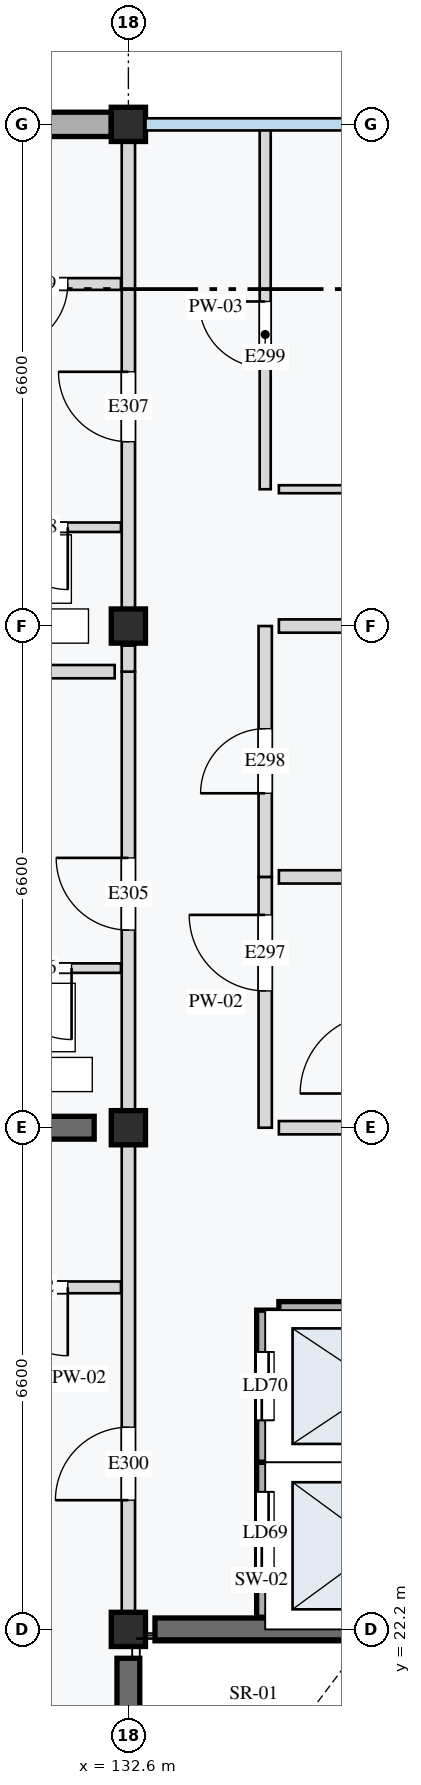
"""IFC4 building model, lengths in metres.
Left out: names, types, materials, properties, quantities, classifications, styles, units other than length and angle.
Written with IfcOpenShell. Run it as: python <this file> out.ifc"""

import sys

from ifc_helpers import new_model, si_unit, direction, frame, frame_2d, origin, origin_2d, place, context, subcontext, project, spatial, rectangle, extrude, element, fill, save


model = new_model("IFC4")
c1 = context("Model", 3, precision=1e-05, world=origin(), true_north=direction((0.0, 1.0)))
c2 = subcontext(c1, "Body", "Model", "MODEL_VIEW")
j1 = project(units=[si_unit("LENGTHUNIT", "METRE"), si_unit("PLANEANGLEUNIT", "RADIAN")], contexts=[c1])
p1 = place(None, origin())
s1 = spatial("IfcSite", under=j1, at=p1, CompositionType="ELEMENT")
p2 = place(p1, origin())
s2 = spatial("IfcBuilding", under=s1, at=p2, CompositionType="ELEMENT")
p3 = place(p2, frame((0.0, 0.0, 24.4)))
s3 = spatial("IfcBuildingStorey", under=s2, at=p3, CompositionType="ELEMENT", Elevation=24.4)
for number, where, z_axis, x_axis in (
    (1, (132.6, 22.2, 0.0), (0.0, 0.0, 1.0), (1.0, 0.0, 0.0)),
    (2, (132.6, 28.8, 0.0), (0.0, 0.0, 1.0), (1.0, 0.0, 0.0)),
    (3, (132.6, 35.4, 0.0), (0.0, 0.0, 1.0), (1.0, 0.0, 0.0)),
    (4, (132.6, 42.0, 0.0), (0.0, 0.0, 1.0), (1.0, 0.0, 0.0)),
):
    element("IfcColumn", number, at=place(p3, frame(where, z_axis=z_axis, x_axis=x_axis)), inside=s3, PredefinedType="COLUMN", context=c2, shape_type="SweptSolid", body=[
        extrude(rectangle(XDim=0.45, YDim=0.45, at=origin_2d()), origin(), (0.0, 0.0, 1.0), 3.2),
    ])
p4 = place(p3, frame((132.6, 15.98, 0.0), z_axis=(0.0, 0.0, 1.0), x_axis=(0.0, 1.0, 0.0)))
e5 = element("IfcWall", 5, at=p4, inside=s3, PredefinedType="SHEAR", context=c2, shape_type="SweptSolid", body=[
    extrude(rectangle(XDim=5.84, YDim=0.3, at=frame_2d((2.92, 0.0))), origin(), (0.0, 0.0, 1.0), 2.97),
])
p5 = place(p3, frame((132.95, 22.2, 0.0), z_axis=(0.0, 0.0, 1.0), x_axis=(1.0, 0.0, 0.0)))
e6 = element("IfcWall", 6, at=p5, inside=s3, PredefinedType="SHEAR", context=c2, shape_type="SweptSolid", body=[
    extrude(rectangle(XDim=2.8, YDim=0.3, at=frame_2d((1.4, 0.0))), origin(), (0.0, 0.0, 1.0), 2.97),
])
p6 = place(p3, frame((126.45, 28.8, 0.0), z_axis=(0.0, 0.0, 1.0), x_axis=(1.0, 0.0, 0.0)))
e7 = element("IfcWall", 7, at=p6, inside=s3, PredefinedType="SHEAR", context=c2, shape_type="SweptSolid", body=[
    extrude(rectangle(XDim=5.7, YDim=0.3, at=frame_2d((2.85, 0.0))), origin(), (0.0, 0.0, 1.0), 2.97),
])
p7 = place(p3, frame((126.225, 42.0, 0.0), z_axis=(0.0, 0.0, 1.0), x_axis=(1.0, 0.0, 0.0)))
e8 = element("IfcWall", 8, at=p7, inside=s3, PredefinedType="STANDARD", context=c2, shape_type="SweptSolid", body=[
    extrude(rectangle(XDim=6.15, YDim=0.32, at=frame_2d((3.075, 0.0))), origin(), (0.0, 0.0, 1.0), 2.65),
])
p8 = place(p3, frame((134.4, 22.36, 0.0), z_axis=(0.0, 0.0, 1.0), x_axis=(0.0, 1.0, 0.0)))
e9 = element("IfcWall", 9, at=p8, inside=s3, PredefinedType="STANDARD", context=c2, shape_type="SweptSolid", body=[
    extrude(rectangle(XDim=2.04, YDim=0.225, at=frame_2d((1.02, 0.0))), origin(), (0.0, 0.0, 1.0), 2.97),
])
p9 = place(p8, frame((0.55, 0.0, 0.0)))
e10 = element("IfcOpeningElement", 10, at=p9, cuts=e9, PredefinedType="OPENING", context=c2, shape_type="SweptSolid", body=[
    extrude(rectangle(XDim=1.1, YDim=2.1, at=frame_2d((0.55, 1.05))), frame((0.0, 0.123, 0.0), z_axis=(0.0, -1.0, 0.0), x_axis=(1.0, 0.0, 0.0)), (0.0, 0.0, 1.0), 0.245),
])
p10 = place(p3, frame((134.4, 24.4, 0.0), z_axis=(0.0, 0.0, 1.0), x_axis=(0.0, 1.0, 0.0)))
e11 = element("IfcWall", 11, at=p10, inside=s3, PredefinedType="STANDARD", context=c2, shape_type="SweptSolid", body=[
    extrude(rectangle(XDim=2.0, YDim=0.225, at=frame_2d((1.0, 0.0))), origin(), (0.0, 0.0, 1.0), 2.97),
])
p11 = place(p10, frame((0.55, 0.0, 0.0)))
e12 = element("IfcOpeningElement", 12, at=p11, cuts=e11, PredefinedType="OPENING", context=c2, shape_type="SweptSolid", body=[
    extrude(rectangle(XDim=0.9, YDim=2.1, at=frame_2d((0.45, 1.05))), frame((0.0, 0.123, 0.0), z_axis=(0.0, -1.0, 0.0), x_axis=(1.0, 0.0, 0.0)), (0.0, 0.0, 1.0), 0.245),
])
for number, where, z_axis, x_axis in (
    (13, (134.58, 24.4, 0.0), (0.0, 0.0, 1.0), (1.0, 0.0, 0.0)),
    (14, (134.58, 26.4, 0.0), (0.0, 0.0, 1.0), (1.0, 0.0, 0.0)),
):
    element("IfcWall", number, at=place(p3, frame(where, z_axis=z_axis, x_axis=x_axis)), inside=s3, PredefinedType="STANDARD", context=c2, shape_type="SweptSolid", body=[
        extrude(rectangle(XDim=2.64, YDim=0.225, at=frame_2d((1.32, 0.0))), origin(), (0.0, 0.0, 1.0), 2.97),
    ])
p12 = place(p3, frame((134.4, 28.8, 0.0), z_axis=(0.0, 0.0, 1.0), x_axis=(0.0, 1.0, 0.0)))
e15 = element("IfcWall", 15, at=p12, inside=s3, PredefinedType="PARTITIONING", context=c2, shape_type="SweptSolid", body=[
    extrude(rectangle(XDim=3.3, YDim=0.175, at=frame_2d((1.65, 0.0))), origin(), (0.0, 0.0, 1.0), 2.97),
])
p13 = place(p12, frame((1.8, 0.0, 0.0)))
e16 = element("IfcOpeningElement", 16, at=p13, cuts=e15, PredefinedType="OPENING", context=c2, shape_type="SweptSolid", body=[
    extrude(rectangle(XDim=1.0, YDim=2.1, at=frame_2d((0.5, 1.05))), frame((0.0, 0.097, 0.0), z_axis=(0.0, -1.0, 0.0), x_axis=(1.0, 0.0, 0.0)), (0.0, 0.0, 1.0), 0.195),
])
p14 = place(p3, frame((134.4, 32.1, 0.0), z_axis=(0.0, 0.0, 1.0), x_axis=(0.0, 1.0, 0.0)))
e17 = element("IfcWall", 17, at=p14, inside=s3, PredefinedType="PARTITIONING", context=c2, shape_type="SweptSolid", body=[
    extrude(rectangle(XDim=3.3, YDim=0.175, at=frame_2d((1.65, 0.0))), origin(), (0.0, 0.0, 1.0), 2.97),
])
p15 = place(p14, frame((1.1, 0.0, 0.0)))
e18 = element("IfcOpeningElement", 18, at=p15, cuts=e17, PredefinedType="OPENING", context=c2, shape_type="SweptSolid", body=[
    extrude(rectangle(XDim=0.85, YDim=2.0, at=frame_2d((0.425, 1.0))), frame((0.0, 0.097, 0.0), z_axis=(0.0, -1.0, 0.0), x_axis=(1.0, 0.0, 0.0)), (0.0, 0.0, 1.0), 0.195),
])
for number, where, z_axis, x_axis in (
    (19, (134.58, 28.8, 0.0), (0.0, 0.0, 1.0), (1.0, 0.0, 0.0)),
    (20, (134.58, 32.1, 0.0), (0.0, 0.0, 1.0), (1.0, 0.0, 0.0)),
    (21, (134.58, 35.4, 0.0), (0.0, 0.0, 1.0), (1.0, 0.0, 0.0)),
):
    element("IfcWall", number, at=place(p3, frame(where, z_axis=z_axis, x_axis=x_axis)), inside=s3, PredefinedType="PARTITIONING", context=c2, shape_type="SweptSolid", body=[
        extrude(rectangle(XDim=1.14, YDim=0.175, at=frame_2d((0.57, 0.0))), origin(), (0.0, 0.0, 1.0), 2.97),
    ])
p16 = place(p3, frame((134.4, 37.2, 0.0), z_axis=(0.0, 0.0, 1.0), x_axis=(0.0, 1.0, 0.0)))
e22 = element("IfcWall", 22, at=p16, inside=s3, PredefinedType="PARTITIONING", context=c2, shape_type="SweptSolid", body=[
    extrude(rectangle(XDim=4.8, YDim=0.145, at=frame_2d((2.4, 0.0))), origin(), (0.0, 0.0, 1.0), 2.97),
])
p17 = place(p16, frame((1.6, 0.0, 0.0)))
e23 = element("IfcOpeningElement", 23, at=p17, cuts=e22, PredefinedType="OPENING", context=c2, shape_type="SweptSolid", body=[
    extrude(rectangle(XDim=0.87, YDim=2.08, at=frame_2d((0.435, 1.04))), frame((0.0, 0.083, 0.0), z_axis=(0.0, -1.0, 0.0), x_axis=(1.0, 0.0, 0.0)), (0.0, 0.0, 1.0), 0.165),
])
p18 = place(p3, frame((134.58, 37.2, 0.0), z_axis=(0.0, 0.0, 1.0), x_axis=(1.0, 0.0, 0.0)))
e24 = element("IfcWall", 24, at=p18, inside=s3, PredefinedType="PARTITIONING", context=c2, shape_type="SweptSolid", body=[
    extrude(rectangle(XDim=2.64, YDim=0.105, at=frame_2d((1.32, 0.0))), origin(), (0.0, 0.0, 1.0), 2.97),
])
p19 = place(p3, frame((132.6, 22.2, 0.0), z_axis=(0.0, 0.0, 1.0), x_axis=(0.0, 1.0, 0.0)))
e25 = element("IfcWall", 25, at=p19, inside=s3, PredefinedType="PARTITIONING", context=c2, shape_type="SweptSolid", body=[
    extrude(rectangle(XDim=6.6, YDim=0.175, at=frame_2d((3.3, 0.0))), origin(), (0.0, 0.0, 1.0), 2.7),
])
p20 = place(p19, frame((1.7, 0.0, 0.0)))
e26 = element("IfcOpeningElement", 26, at=p20, cuts=e25, PredefinedType="OPENING", context=c2, shape_type="SweptSolid", body=[
    extrude(rectangle(XDim=0.96, YDim=2.18, at=frame_2d((0.48, 1.09))), frame((0.0, 0.097, 0.0), z_axis=(0.0, -1.0, 0.0), x_axis=(1.0, 0.0, 0.0)), (0.0, 0.0, 1.0), 0.195),
])
p21 = place(p3, frame((132.502, 26.7, 0.0), z_axis=(0.0, 0.0, 1.0), x_axis=(-1.0, 0.0, 0.0)))
e27 = element("IfcWall", 27, at=p21, inside=s3, PredefinedType="PARTITIONING", context=c2, shape_type="SweptSolid", body=[
    extrude(rectangle(XDim=2.302, YDim=0.155, at=frame_2d((1.151, 0.0))), origin(), (0.0, 0.0, 1.0), 2.97),
])
p22 = place(p21, frame((0.7, 0.0, 0.0)))
e28 = element("IfcOpeningElement", 28, at=p22, cuts=e27, PredefinedType="OPENING", context=c2, shape_type="SweptSolid", body=[
    extrude(rectangle(XDim=0.9, YDim=2.16, at=frame_2d((0.45, 1.08))), frame((0.0, 0.087, 0.0), z_axis=(0.0, -1.0, 0.0), x_axis=(1.0, 0.0, 0.0)), (0.0, 0.0, 1.0), 0.175),
])
p23 = place(p3, frame((132.6, 28.8, 0.0), z_axis=(0.0, 0.0, 1.0), x_axis=(0.0, 1.0, 0.0)))
e29 = element("IfcWall", 29, at=p23, inside=s3, PredefinedType="PARTITIONING", context=c2, shape_type="SweptSolid", body=[
    extrude(rectangle(XDim=6.0, YDim=0.175, at=frame_2d((3.0, 0.0))), origin(), (0.0, 0.0, 1.0), 2.7),
])
p24 = place(p23, frame((2.6, 0.0, 0.0)))
e30 = element("IfcOpeningElement", 30, at=p24, cuts=e29, PredefinedType="OPENING", context=c2, shape_type="SweptSolid", body=[
    extrude(rectangle(XDim=0.95, YDim=2.1, at=frame_2d((0.475, 1.05))), frame((0.0, 0.097, 0.0), z_axis=(0.0, -1.0, 0.0), x_axis=(1.0, 0.0, 0.0)), (0.0, 0.0, 1.0), 0.195),
])
p25 = place(p3, frame((132.502, 30.9, 0.0), z_axis=(0.0, 0.0, 1.0), x_axis=(-1.0, 0.0, 0.0)))
e31 = element("IfcWall", 31, at=p25, inside=s3, PredefinedType="PARTITIONING", context=c2, shape_type="SweptSolid", body=[
    extrude(rectangle(XDim=2.202, YDim=0.125, at=frame_2d((1.101, 0.0))), origin(), (0.0, 0.0, 1.0), 2.97),
])
p26 = place(p25, frame((0.65, 0.0, 0.0)))
e32 = element("IfcOpeningElement", 32, at=p26, cuts=e31, PredefinedType="OPENING", context=c2, shape_type="SweptSolid", body=[
    extrude(rectangle(XDim=0.94, YDim=2.08, at=frame_2d((0.47, 1.04))), frame((0.0, 0.073, 0.0), z_axis=(0.0, -1.0, 0.0), x_axis=(1.0, 0.0, 0.0)), (0.0, 0.0, 1.0), 0.145),
])
p27 = place(p3, frame((132.42, 34.8, 0.0), z_axis=(0.0, 0.0, 1.0), x_axis=(-1.0, 0.0, 0.0)))
e33 = element("IfcWall", 33, at=p27, inside=s3, PredefinedType="PARTITIONING", context=c2, shape_type="SweptSolid", body=[
    extrude(rectangle(XDim=6.19, YDim=0.175, at=frame_2d((3.095, 0.0))), origin(), (0.0, 0.0, 1.0), 2.97),
])
p28 = place(p3, frame((132.6, 34.8, 0.0), z_axis=(0.0, 0.0, 1.0), x_axis=(0.0, 1.0, 0.0)))
e34 = element("IfcWall", 34, at=p28, inside=s3, PredefinedType="PARTITIONING", context=c2, shape_type="SweptSolid", body=[
    extrude(rectangle(XDim=0.345, YDim=0.175, at=frame_2d((0.172, 0.0))), origin(), (0.0, 0.0, 1.0), 2.97),
])
p29 = place(p3, frame((132.6, 35.145, 0.0), z_axis=(0.0, 0.0, 1.0), x_axis=(0.0, 1.0, 0.0)))
e35 = element("IfcWall", 35, at=p29, inside=s3, PredefinedType="PARTITIONING", context=c2, shape_type="SweptSolid", body=[
    extrude(rectangle(XDim=6.855, YDim=0.175, at=frame_2d((3.427, 0.0))), origin(), (0.0, 0.0, 1.0), 2.7),
])
p30 = place(p29, frame((2.68, 0.0, 0.0)))
e36 = element("IfcOpeningElement", 36, at=p30, cuts=e35, PredefinedType="OPENING", context=c2, shape_type="SweptSolid", body=[
    extrude(rectangle(XDim=0.92, YDim=2.14, at=frame_2d((0.46, 1.07))), frame((0.0, 0.097, 0.0), z_axis=(0.0, -1.0, 0.0), x_axis=(1.0, 0.0, 0.0)), (0.0, 0.0, 1.0), 0.195),
])
p31 = place(p3, frame((132.502, 36.7, 0.0), z_axis=(0.0, 0.0, 1.0), x_axis=(-1.0, 0.0, 0.0)))
e37 = element("IfcWall", 37, at=p31, inside=s3, PredefinedType="PARTITIONING", context=c2, shape_type="SweptSolid", body=[
    extrude(rectangle(XDim=2.302, YDim=0.125, at=frame_2d((1.151, 0.0))), origin(), (0.0, 0.0, 1.0), 2.97),
])
p32 = place(p31, frame((0.7, 0.0, 0.0)))
e38 = element("IfcOpeningElement", 38, at=p32, cuts=e37, PredefinedType="OPENING", context=c2, shape_type="SweptSolid", body=[
    extrude(rectangle(XDim=0.82, YDim=2.05, at=frame_2d((0.41, 1.025))), frame((0.0, 0.073, 0.0), z_axis=(0.0, -1.0, 0.0), x_axis=(1.0, 0.0, 0.0)), (0.0, 0.0, 1.0), 0.145),
])
p33 = place(p3, frame((132.502, 39.9, 0.0), z_axis=(0.0, 0.0, 1.0), x_axis=(-1.0, 0.0, 0.0)))
e39 = element("IfcWall", 39, at=p33, inside=s3, PredefinedType="PARTITIONING", context=c2, shape_type="SweptSolid", body=[
    extrude(rectangle(XDim=2.302, YDim=0.155, at=frame_2d((1.151, 0.0))), origin(), (0.0, 0.0, 1.0), 2.97),
])
p34 = place(p33, frame((0.7, 0.0, 0.0)))
e40 = element("IfcOpeningElement", 40, at=p34, cuts=e39, PredefinedType="OPENING", context=c2, shape_type="SweptSolid", body=[
    extrude(rectangle(XDim=0.85, YDim=2.1, at=frame_2d((0.425, 1.05))), frame((0.0, 0.087, 0.0), z_axis=(0.0, -1.0, 0.0), x_axis=(1.0, 0.0, 0.0)), (0.0, 0.0, 1.0), 0.175),
])
p35 = place(p9, origin())
e41 = element("IfcDoor", 41, at=p35, inside=s3, OperationType="DOUBLE_DOOR_SLIDING", PredefinedType="DOOR", context=c2, shape_type="SweptSolid", body=[
    extrude(rectangle(XDim=1.1, YDim=2.1, at=frame_2d((0.55, 1.05))), frame((0.0, 0.025, 0.0), z_axis=(0.0, -1.0, 0.0), x_axis=(1.0, 0.0, 0.0)), (0.0, 0.0, 1.0), 0.05),
])
fill(e10, e41)
p36 = place(p11, origin())
e42 = element("IfcDoor", 42, at=p36, inside=s3, OperationType="DOUBLE_DOOR_SLIDING", PredefinedType="DOOR", context=c2, shape_type="SweptSolid", body=[
    extrude(rectangle(XDim=0.9, YDim=2.1, at=frame_2d((0.45, 1.05))), frame((0.0, 0.025, 0.0), z_axis=(0.0, -1.0, 0.0), x_axis=(1.0, 0.0, 0.0)), (0.0, 0.0, 1.0), 0.05),
])
fill(e12, e42)
p37 = place(p13, origin())
e43 = element("IfcDoor", 43, at=p37, inside=s3, OperationType="SINGLE_SWING_RIGHT", PredefinedType="DOOR", context=c2, shape_type="SweptSolid", body=[
    extrude(rectangle(XDim=1.0, YDim=2.1, at=frame_2d((0.5, 1.05))), frame((0.0, 0.025, 0.0), z_axis=(0.0, -1.0, 0.0), x_axis=(1.0, 0.0, 0.0)), (0.0, 0.0, 1.0), 0.05),
])
fill(e16, e43)
p38 = place(p15, origin())
e44 = element("IfcDoor", 44, at=p38, inside=s3, OperationType="SINGLE_SWING_LEFT", PredefinedType="DOOR", context=c2, shape_type="SweptSolid", body=[
    extrude(rectangle(XDim=0.85, YDim=2.0, at=frame_2d((0.425, 1.0))), frame((0.0, 0.025, 0.0), z_axis=(0.0, -1.0, 0.0), x_axis=(1.0, 0.0, 0.0)), (0.0, 0.0, 1.0), 0.05),
])
fill(e18, e44)
p39 = place(p17, origin())
e45 = element("IfcDoor", 45, at=p39, inside=s3, OperationType="SINGLE_SWING_RIGHT", PredefinedType="DOOR", context=c2, shape_type="SweptSolid", body=[
    extrude(rectangle(XDim=0.87, YDim=2.08, at=frame_2d((0.435, 1.04))), frame((0.0, 0.025, 0.0), z_axis=(0.0, -1.0, 0.0), x_axis=(1.0, 0.0, 0.0)), (0.0, 0.0, 1.0), 0.05),
])
fill(e23, e45)
p40 = place(p20, origin())
e46 = element("IfcDoor", 46, at=p40, inside=s3, OperationType="SINGLE_SWING_LEFT", PredefinedType="DOOR", context=c2, shape_type="SweptSolid", body=[
    extrude(rectangle(XDim=0.96, YDim=2.18, at=frame_2d((0.48, 1.09))), frame((0.0, 0.025, 0.0), z_axis=(0.0, -1.0, 0.0), x_axis=(1.0, 0.0, 0.0)), (0.0, 0.0, 1.0), 0.05),
])
fill(e26, e46)
p41 = place(p22, origin())
e47 = element("IfcDoor", 47, at=p41, inside=s3, OperationType="SINGLE_SWING_LEFT", PredefinedType="DOOR", context=c2, shape_type="SweptSolid", body=[
    extrude(rectangle(XDim=0.9, YDim=2.16, at=frame_2d((0.45, 1.08))), frame((0.0, 0.025, 0.0), z_axis=(0.0, -1.0, 0.0), x_axis=(1.0, 0.0, 0.0)), (0.0, 0.0, 1.0), 0.05),
])
fill(e28, e47)
p42 = place(p24, origin())
e48 = element("IfcDoor", 48, at=p42, inside=s3, OperationType="SINGLE_SWING_RIGHT", PredefinedType="DOOR", context=c2, shape_type="SweptSolid", body=[
    extrude(rectangle(XDim=0.95, YDim=2.1, at=frame_2d((0.475, 1.05))), frame((0.0, 0.025, 0.0), z_axis=(0.0, -1.0, 0.0), x_axis=(1.0, 0.0, 0.0)), (0.0, 0.0, 1.0), 0.05),
])
fill(e30, e48)
p43 = place(p26, origin())
e49 = element("IfcDoor", 49, at=p43, inside=s3, OperationType="SINGLE_SWING_LEFT", PredefinedType="DOOR", context=c2, shape_type="SweptSolid", body=[
    extrude(rectangle(XDim=0.94, YDim=2.08, at=frame_2d((0.47, 1.04))), frame((0.0, 0.025, 0.0), z_axis=(0.0, -1.0, 0.0), x_axis=(1.0, 0.0, 0.0)), (0.0, 0.0, 1.0), 0.05),
])
fill(e32, e49)
p44 = place(p30, origin())
e50 = element("IfcDoor", 50, at=p44, inside=s3, OperationType="SINGLE_SWING_RIGHT", PredefinedType="DOOR", context=c2, shape_type="SweptSolid", body=[
    extrude(rectangle(XDim=0.92, YDim=2.14, at=frame_2d((0.46, 1.07))), frame((0.0, 0.025, 0.0), z_axis=(0.0, -1.0, 0.0), x_axis=(1.0, 0.0, 0.0)), (0.0, 0.0, 1.0), 0.05),
])
fill(e36, e50)
p45 = place(p32, origin())
e51 = element("IfcDoor", 51, at=p45, inside=s3, OperationType="SINGLE_SWING_LEFT", PredefinedType="DOOR", context=c2, shape_type="SweptSolid", body=[
    extrude(rectangle(XDim=0.82, YDim=2.05, at=frame_2d((0.41, 1.025))), frame((0.0, 0.025, 0.0), z_axis=(0.0, -1.0, 0.0), x_axis=(1.0, 0.0, 0.0)), (0.0, 0.0, 1.0), 0.05),
])
fill(e38, e51)
p46 = place(p34, origin())
e52 = element("IfcDoor", 52, at=p46, inside=s3, OperationType="SINGLE_SWING_RIGHT", PredefinedType="DOOR", context=c2, shape_type="SweptSolid", body=[
    extrude(rectangle(XDim=0.85, YDim=2.1, at=frame_2d((0.425, 1.05))), frame((0.0, 0.025, 0.0), z_axis=(0.0, -1.0, 0.0), x_axis=(1.0, 0.0, 0.0)), (0.0, 0.0, 1.0), 0.05),
])
fill(e40, e52)
save(model, sys.argv[1])
